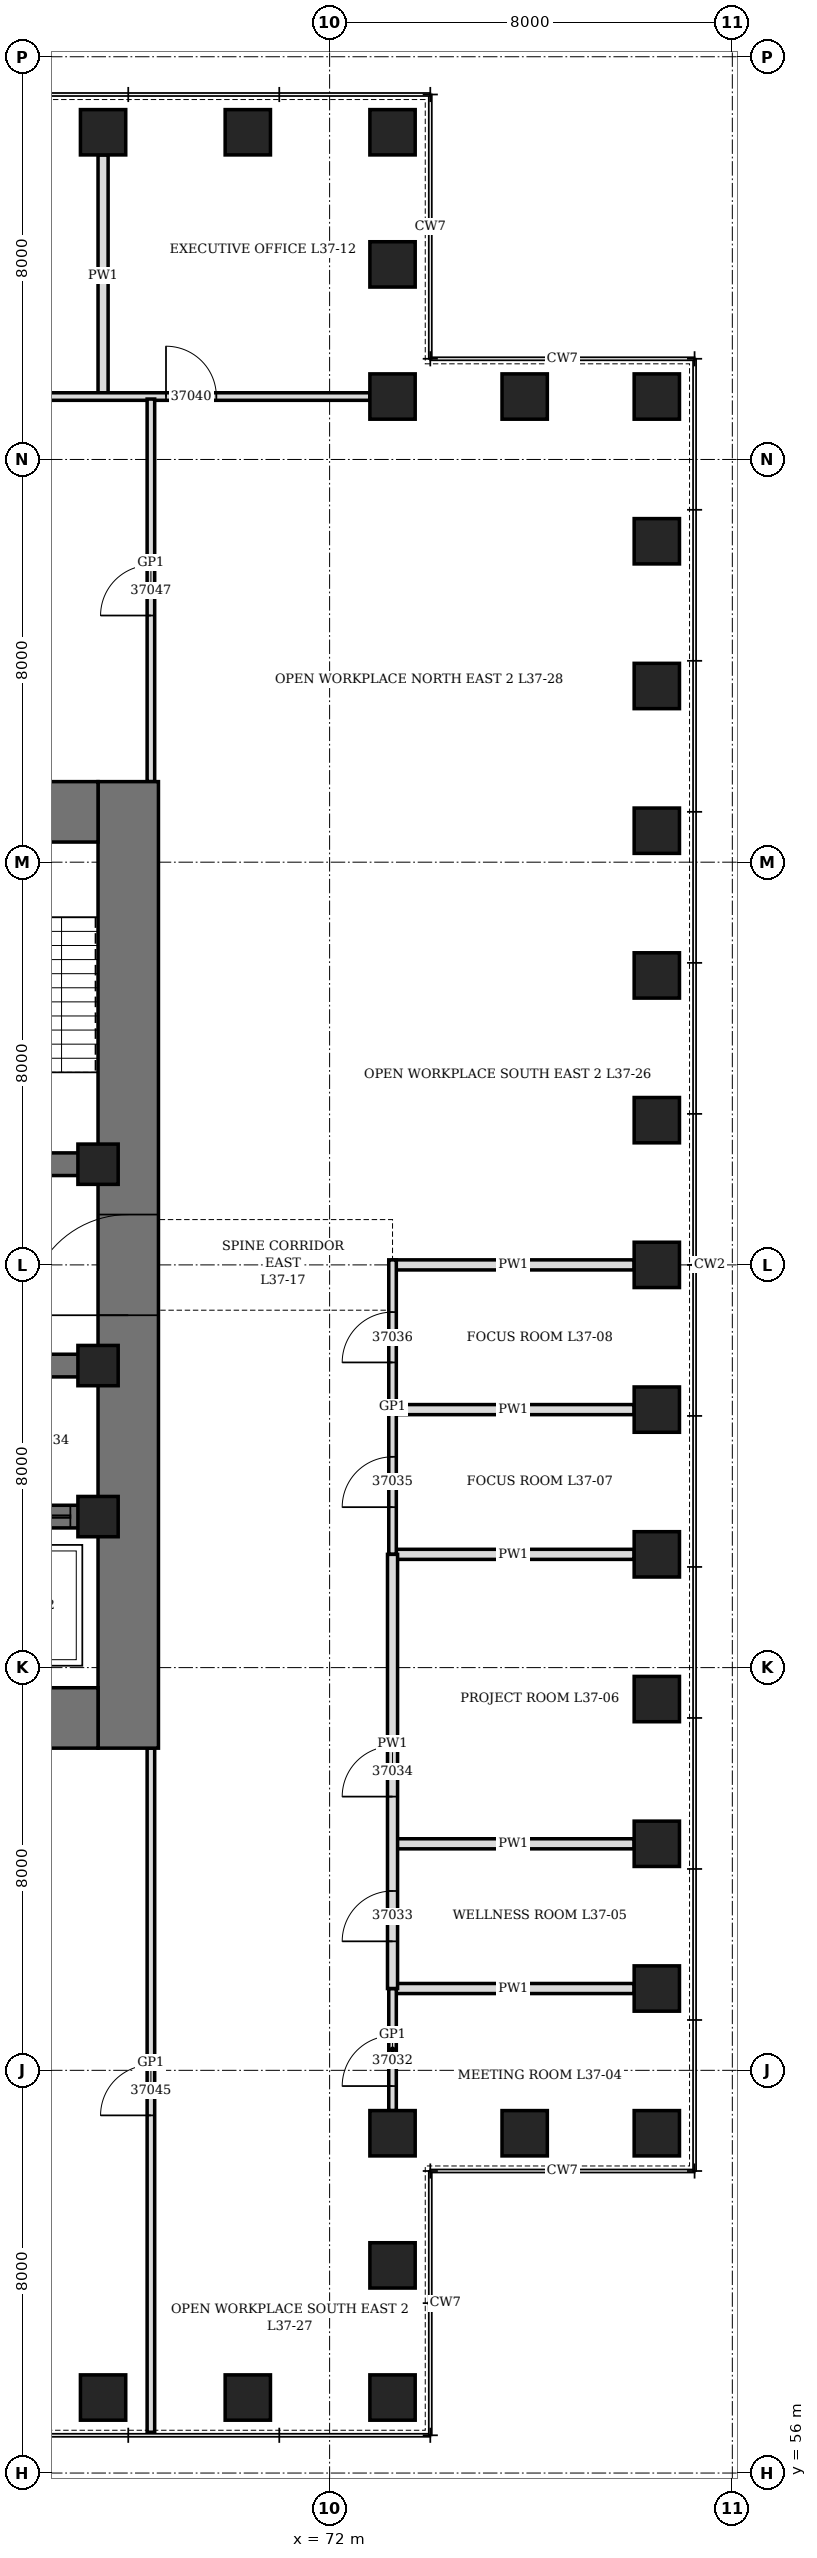
"""IFC4 building model, lengths in metres.
Left out: names, types, materials, properties, quantities, classifications, styles, units other than length and angle.
Written with IfcOpenShell. Run it as: python <this file> out.ifc"""

import sys

from ifc_helpers import new_model, si_unit, direction, frame, frame_2d, origin, origin_2d, place, context, subcontext, project, spatial, rectangle, hollow_rectangle, extrude, element, fill, save


model = new_model("IFC4")
c1 = context("Model", 3, precision=1e-05, world=origin(), true_north=direction((0.0, 1.0)))
c2 = subcontext(c1, "Body", "Model", "MODEL_VIEW")
j1 = project(units=[si_unit("LENGTHUNIT", "METRE"), si_unit("PLANEANGLEUNIT", "RADIAN")], contexts=[c1])
p1 = place(None, origin())
s1 = spatial("IfcSite", under=j1, at=p1, CompositionType="ELEMENT")
p2 = place(p1, origin())
s2 = spatial("IfcBuilding", under=s1, at=p2, CompositionType="ELEMENT")
p3 = place(p2, frame((0.0, 0.0, 166.9)))
s3 = spatial("IfcBuildingStorey", under=s2, at=p3, CompositionType="ELEMENT", Elevation=166.9)
for number, where, z_axis, x_axis in (
    (1, (67.5, 57.5, 0.0), (0.0, 0.0, 1.0), (1.0, 0.0, 0.0)),
    (2, (70.375, 57.5, 0.0), (0.0, 0.0, 1.0), (1.0, 0.0, 0.0)),
    (3, (73.25, 57.5, 0.0), (0.0, 0.0, 1.0), (0.0, 1.0, 0.0)),
    (4, (73.25, 60.125, 0.0), (0.0, 0.0, 1.0), (0.0, 1.0, 0.0)),
    (5, (73.25, 62.75, 0.0), (0.0, 0.0, 1.0), (1.0, 0.0, 0.0)),
    (6, (75.875, 62.75, 0.0), (0.0, 0.0, 1.0), (1.0, 0.0, 0.0)),
    (7, (78.5, 62.75, 0.0), (0.0, 0.0, 1.0), (0.0, 1.0, 0.0)),
    (8, (78.5, 65.625, 0.0), (0.0, 0.0, 1.0), (0.0, 1.0, 0.0)),
    (9, (78.5, 68.5, 0.0), (0.0, 0.0, 1.0), (0.0, 1.0, 0.0)),
    (10, (78.5, 71.375, 0.0), (0.0, 0.0, 1.0), (0.0, 1.0, 0.0)),
    (11, (78.5, 74.25, 0.0), (0.0, 0.0, 1.0), (0.0, 1.0, 0.0)),
    (12, (78.5, 77.125, 0.0), (0.0, 0.0, 1.0), (0.0, 1.0, 0.0)),
    (13, (78.5, 80.0, 0.0), (0.0, 0.0, 1.0), (0.0, 1.0, 0.0)),
    (14, (78.5, 82.875, 0.0), (0.0, 0.0, 1.0), (0.0, 1.0, 0.0)),
    (15, (78.5, 85.75, 0.0), (0.0, 0.0, 1.0), (0.0, 1.0, 0.0)),
    (16, (78.5, 88.625, 0.0), (0.0, 0.0, 1.0), (0.0, 1.0, 0.0)),
    (17, (78.5, 91.5, 0.0), (0.0, 0.0, 1.0), (0.0, 1.0, 0.0)),
    (18, (78.5, 94.375, 0.0), (0.0, 0.0, 1.0), (0.0, 1.0, 0.0)),
    (19, (78.5, 97.25, 0.0), (0.0, 0.0, 1.0), (1.0, 0.0, 0.0)),
    (20, (75.875, 97.25, 0.0), (0.0, 0.0, 1.0), (1.0, 0.0, 0.0)),
    (21, (73.25, 97.25, 0.0), (0.0, 0.0, 1.0), (0.0, 1.0, 0.0)),
    (22, (73.25, 99.875, 0.0), (0.0, 0.0, 1.0), (0.0, 1.0, 0.0)),
    (23, (73.25, 102.5, 0.0), (0.0, 0.0, 1.0), (1.0, 0.0, 0.0)),
    (24, (70.375, 102.5, 0.0), (0.0, 0.0, 1.0), (1.0, 0.0, 0.0)),
    (25, (67.5, 102.5, 0.0), (0.0, 0.0, 1.0), (1.0, 0.0, 0.0)),
):
    element("IfcColumn", number, at=place(p3, frame(where, z_axis=z_axis, x_axis=x_axis)), inside=s3, PredefinedType="COLUMN", context=c2, shape_type="SweptSolid", body=[
        extrude(hollow_rectangle(XDim=0.9, YDim=0.9, WallThickness=0.12, at=origin_2d()), origin(), (0.0, 0.0, 1.0), 4.2),
    ])
p4 = place(p3, frame((68.0, 70.4, 0.0), z_axis=(0.0, 0.0, 1.0), x_axis=(0.0, 1.0, 0.0)))
e26 = element("IfcWall", 26, at=p4, inside=s3, PredefinedType="SHEAR", context=c2, shape_type="SweptSolid", body=[
    extrude(rectangle(XDim=19.2, YDim=1.2, at=frame_2d((9.6, 0.0))), origin(), (0.0, 0.0, 1.0), 4.2),
])
p5 = place(p4, frame((8.6, 0.0, 0.0)))
e27 = element("IfcOpeningElement", 27, at=p5, cuts=e26, PredefinedType="OPENING", context=c2, shape_type="SweptSolid", body=[
    extrude(rectangle(XDim=2.0, YDim=2.4, at=frame_2d((1.0, 1.2))), frame((0.0, 0.61, 0.0), z_axis=(0.0, -1.0, 0.0), x_axis=(1.0, 0.0, 0.0)), (0.0, 0.0, 1.0), 1.22),
])
p6 = place(p3, frame((44.6, 71.0, 0.0), z_axis=(0.0, 0.0, 1.0), x_axis=(1.0, 0.0, 0.0)))
e28 = element("IfcWall", 28, at=p6, inside=s3, PredefinedType="SHEAR", context=c2, shape_type="SweptSolid", body=[
    extrude(rectangle(XDim=22.8, YDim=1.2, at=frame_2d((11.4, 0.0))), origin(), (0.0, 0.0, 1.0), 4.2),
])
p7 = place(p3, frame((44.6, 89.0, 0.0), z_axis=(0.0, 0.0, 1.0), x_axis=(1.0, 0.0, 0.0)))
e29 = element("IfcWall", 29, at=p7, inside=s3, PredefinedType="SHEAR", context=c2, shape_type="SweptSolid", body=[
    extrude(rectangle(XDim=22.8, YDim=1.2, at=frame_2d((11.4, 0.0))), origin(), (0.0, 0.0, 1.0), 4.2),
])
p8 = place(p7, frame((6.525, 0.0, 0.0)))
e30 = element("IfcOpeningElement", 30, at=p8, cuts=e29, PredefinedType="OPENING", context=c2, shape_type="SweptSolid", body=[
    extrude(rectangle(XDim=1.0, YDim=2.1, at=frame_2d((0.5, 1.05))), frame((0.0, 0.61, 0.0), z_axis=(0.0, -1.0, 0.0), x_axis=(1.0, 0.0, 0.0)), (0.0, 0.0, 1.0), 1.22),
])
p9 = place(p7, frame((9.45, 0.0, 0.0)))
e31 = element("IfcOpeningElement", 31, at=p9, cuts=e29, PredefinedType="OPENING", context=c2, shape_type="SweptSolid", body=[
    extrude(rectangle(XDim=0.9, YDim=2.1, at=frame_2d((0.45, 1.05))), frame((0.0, 0.61, 0.0), z_axis=(0.0, -1.0, 0.0), x_axis=(1.0, 0.0, 0.0)), (0.0, 0.0, 1.0), 1.22),
])
p10 = place(p7, frame((12.025, 0.0, 0.0)))
e32 = element("IfcOpeningElement", 32, at=p10, cuts=e29, PredefinedType="OPENING", context=c2, shape_type="SweptSolid", body=[
    extrude(rectangle(XDim=0.9, YDim=2.1, at=frame_2d((0.45, 1.05))), frame((0.0, 0.61, 0.0), z_axis=(0.0, -1.0, 0.0), x_axis=(1.0, 0.0, 0.0)), (0.0, 0.0, 1.0), 1.22),
])
p11 = place(p7, frame((13.962, 0.0, 0.0)))
e33 = element("IfcOpeningElement", 33, at=p11, cuts=e29, PredefinedType="OPENING", context=c2, shape_type="SweptSolid", body=[
    extrude(rectangle(XDim=0.9, YDim=2.1, at=frame_2d((0.45, 1.05))), frame((0.0, 0.61, 0.0), z_axis=(0.0, -1.0, 0.0), x_axis=(1.0, 0.0, 0.0)), (0.0, 0.0, 1.0), 1.22),
])
p12 = place(p3, frame((62.225, 75.0, 0.0), z_axis=(0.0, 0.0, 1.0), x_axis=(1.0, 0.0, 0.0)))
e34 = element("IfcWall", 34, at=p12, inside=s3, PredefinedType="SHEAR", context=c2, shape_type="SweptSolid", body=[
    extrude(rectangle(XDim=5.175, YDim=0.45, at=frame_2d((2.587, 0.0))), origin(), (0.0, 0.0, 1.0), 4.2),
])
p13 = place(p12, frame((0.675, 0.0, 0.0)))
e35 = element("IfcOpeningElement", 35, at=p13, cuts=e34, PredefinedType="OPENING", context=c2, shape_type="SweptSolid", body=[
    extrude(rectangle(XDim=1.2, YDim=2.2, at=frame_2d((0.6, 1.1))), frame((0.0, 0.235, 0.0), z_axis=(0.0, -1.0, 0.0), x_axis=(1.0, 0.0, 0.0)), (0.0, 0.0, 1.0), 0.47),
])
p14 = place(p12, frame((3.425, 0.0, 0.0)))
e36 = element("IfcOpeningElement", 36, at=p14, cuts=e34, PredefinedType="OPENING", context=c2, shape_type="SweptSolid", body=[
    extrude(rectangle(XDim=1.2, YDim=2.2, at=frame_2d((0.6, 1.1))), frame((0.0, 0.235, 0.0), z_axis=(0.0, -1.0, 0.0), x_axis=(1.0, 0.0, 0.0)), (0.0, 0.0, 1.0), 0.47),
])
p15 = place(p3, frame((62.225, 78.0, 0.0), z_axis=(0.0, 0.0, 1.0), x_axis=(1.0, 0.0, 0.0)))
e37 = element("IfcWall", 37, at=p15, inside=s3, PredefinedType="SHEAR", context=c2, shape_type="SweptSolid", body=[
    extrude(rectangle(XDim=5.175, YDim=0.45, at=frame_2d((2.587, 0.0))), origin(), (0.0, 0.0, 1.0), 4.2),
])
p16 = place(p15, frame((2.175, 0.0, 0.0)))
e38 = element("IfcOpeningElement", 38, at=p16, cuts=e37, PredefinedType="OPENING", context=c2, shape_type="SweptSolid", body=[
    extrude(rectangle(XDim=1.2, YDim=2.1, at=frame_2d((0.6, 1.05))), frame((0.0, 0.235, 0.0), z_axis=(0.0, -1.0, 0.0), x_axis=(1.0, 0.0, 0.0)), (0.0, 0.0, 1.0), 0.47),
])
p17 = place(p3, frame((62.225, 82.0, 0.0), z_axis=(0.0, 0.0, 1.0), x_axis=(1.0, 0.0, 0.0)))
e39 = element("IfcWall", 39, at=p17, inside=s3, PredefinedType="SHEAR", context=c2, shape_type="SweptSolid", body=[
    extrude(rectangle(XDim=5.175, YDim=0.45, at=frame_2d((2.587, 0.0))), origin(), (0.0, 0.0, 1.0), 4.2),
])
p18 = place(p17, frame((2.175, 0.0, 0.0)))
e40 = element("IfcOpeningElement", 40, at=p18, cuts=e39, PredefinedType="OPENING", context=c2, shape_type="SweptSolid", body=[
    extrude(rectangle(XDim=1.2, YDim=2.1, at=frame_2d((0.6, 1.05))), frame((0.0, 0.235, 0.0), z_axis=(0.0, -1.0, 0.0), x_axis=(1.0, 0.0, 0.0)), (0.0, 0.0, 1.0), 0.47),
])
for number, where, z_axis, x_axis in (
    (41, (67.4, 75.0, 0.0), (0.0, 0.0, 1.0), (1.0, 0.0, 0.0)),
    (42, (67.4, 78.0, 0.0), (0.0, 0.0, 1.0), (1.0, 0.0, 0.0)),
    (43, (67.4, 82.0, 0.0), (0.0, 0.0, 1.0), (1.0, 0.0, 0.0)),
):
    element("IfcColumn", number, at=place(p3, frame(where, z_axis=z_axis, x_axis=x_axis)), inside=s3, PredefinedType="COLUMN", context=c2, shape_type="SweptSolid", body=[
        extrude(hollow_rectangle(XDim=0.8, YDim=0.8, WallThickness=0.1, at=origin_2d()), origin(), (0.0, 0.0, 1.0), 4.2),
    ])
for number, where, z_axis, x_axis in (
    (44, (73.25, 65.625, 0.0), (0.0, 0.0, 1.0), (1.0, 0.0, 0.0)),
    (45, (73.25, 68.5, 0.0), (0.0, 0.0, 1.0), (1.0, 0.0, 0.0)),
    (46, (73.25, 74.25, 0.0), (0.0, 0.0, 1.0), (1.0, 0.0, 0.0)),
    (47, (73.25, 77.125, 0.0), (0.0, 0.0, 1.0), (1.0, 0.0, 0.0)),
    (48, (73.25, 80.0, 0.0), (0.0, 0.0, 1.0), (1.0, 0.0, 0.0)),
):
    element("IfcWall", number, at=place(p3, frame(where, z_axis=z_axis, x_axis=x_axis)), inside=s3, PredefinedType="PARTITIONING", context=c2, shape_type="SweptSolid", body=[
        extrude(rectangle(XDim=4.8, YDim=0.2, at=frame_2d((2.4, 0.0))), origin(), (0.0, 0.0, 1.0), 3.428),
    ])
p19 = place(p3, frame((67.5, 97.25, 0.0), z_axis=(0.0, 0.0, 1.0), x_axis=(0.0, 1.0, 0.0)))
e49 = element("IfcWall", 49, at=p19, inside=s3, PredefinedType="PARTITIONING", context=c2, shape_type="SweptSolid", body=[
    extrude(rectangle(XDim=4.8, YDim=0.2, at=frame_2d((2.4, 0.0))), origin(), (0.0, 0.0, 1.0), 2.74),
])
p20 = place(p3, frame((39.2, 97.25, 0.0), z_axis=(0.0, 0.0, 1.0), x_axis=(1.0, 0.0, 0.0)))
e50 = element("IfcWall", 50, at=p20, inside=s3, PredefinedType="PARTITIONING", context=c2, shape_type="SweptSolid", body=[
    extrude(rectangle(XDim=33.6, YDim=0.15, at=frame_2d((16.8, 0.0))), origin(), (0.0, 0.0, 1.0), 4.04),
])
p21 = place(p20, frame((3.05, 0.0, 0.0)))
e51 = element("IfcOpeningElement", 51, at=p21, cuts=e50, PredefinedType="OPENING", context=c2, shape_type="SweptSolid", body=[
    extrude(rectangle(XDim=1.0, YDim=2.4, at=frame_2d((0.5, 1.2))), frame((0.0, 0.085, 0.0), z_axis=(0.0, -1.0, 0.0), x_axis=(1.0, 0.0, 0.0)), (0.0, 0.0, 1.0), 0.17),
])
p22 = place(p20, frame((14.863, 0.0, 0.0)))
e52 = element("IfcOpeningElement", 52, at=p22, cuts=e50, PredefinedType="OPENING", context=c2, shape_type="SweptSolid", body=[
    extrude(rectangle(XDim=1.0, YDim=2.4, at=frame_2d((0.5, 1.2))), frame((0.0, 0.085, 0.0), z_axis=(0.0, -1.0, 0.0), x_axis=(1.0, 0.0, 0.0)), (0.0, 0.0, 1.0), 0.17),
])
p23 = place(p20, frame((23.488, 0.0, 0.0)))
e53 = element("IfcOpeningElement", 53, at=p23, cuts=e50, PredefinedType="OPENING", context=c2, shape_type="SweptSolid", body=[
    extrude(rectangle(XDim=1.0, YDim=2.1, at=frame_2d((0.5, 1.05))), frame((0.0, 0.085, 0.0), z_axis=(0.0, -1.0, 0.0), x_axis=(1.0, 0.0, 0.0)), (0.0, 0.0, 1.0), 0.17),
])
p24 = place(p20, frame((29.55, 0.0, 0.0)))
e54 = element("IfcOpeningElement", 54, at=p24, cuts=e50, PredefinedType="OPENING", context=c2, shape_type="SweptSolid", body=[
    extrude(rectangle(XDim=1.0, YDim=2.1, at=frame_2d((0.5, 1.05))), frame((0.0, 0.085, 0.0), z_axis=(0.0, -1.0, 0.0), x_axis=(1.0, 0.0, 0.0)), (0.0, 0.0, 1.0), 0.17),
])
p25 = place(p3, frame((68.45, 56.81, 0.0), z_axis=(0.0, 0.0, 1.0), x_axis=(0.0, 1.0, 0.0)))
e55 = element("IfcWall", 55, at=p25, inside=s3, PredefinedType="PARTITIONING", context=c2, shape_type="SweptSolid", body=[
    extrude(rectangle(XDim=13.59, YDim=0.15, at=frame_2d((6.795, 0.0))), origin(), (0.0, 0.0, 1.0), 4.04),
])
p26 = place(p25, frame((6.295, 0.0, 0.0)))
e56 = element("IfcOpeningElement", 56, at=p26, cuts=e55, PredefinedType="OPENING", context=c2, shape_type="SweptSolid", body=[
    extrude(rectangle(XDim=1.0, YDim=2.4, at=frame_2d((0.5, 1.2))), frame((0.0, 0.085, 0.0), z_axis=(0.0, -1.0, 0.0), x_axis=(1.0, 0.0, 0.0)), (0.0, 0.0, 1.0), 0.17),
])
p27 = place(p3, frame((68.45, 89.6, 0.0), z_axis=(0.0, 0.0, 1.0), x_axis=(0.0, 1.0, 0.0)))
e57 = element("IfcWall", 57, at=p27, inside=s3, PredefinedType="PARTITIONING", context=c2, shape_type="SweptSolid", body=[
    extrude(rectangle(XDim=7.6, YDim=0.15, at=frame_2d((3.8, 0.0))), origin(), (0.0, 0.0, 1.0), 4.04),
])
p28 = place(p27, frame((3.3, 0.0, 0.0)))
e58 = element("IfcOpeningElement", 58, at=p28, cuts=e57, PredefinedType="OPENING", context=c2, shape_type="SweptSolid", body=[
    extrude(rectangle(XDim=1.0, YDim=2.4, at=frame_2d((0.5, 1.2))), frame((0.0, 0.085, 0.0), z_axis=(0.0, -1.0, 0.0), x_axis=(1.0, 0.0, 0.0)), (0.0, 0.0, 1.0), 0.17),
])
p29 = place(p3, frame((73.25, 63.2, 0.0), z_axis=(0.0, 0.0, 1.0), x_axis=(0.0, 1.0, 0.0)))
e59 = element("IfcWall", 59, at=p29, inside=s3, PredefinedType="PARTITIONING", context=c2, shape_type="SweptSolid", body=[
    extrude(rectangle(XDim=2.425, YDim=0.15, at=frame_2d((1.212, 0.0))), origin(), (0.0, 0.0, 1.0), 4.04),
])
p30 = place(p29, frame((0.488, 0.0, 0.0)))
e60 = element("IfcOpeningElement", 60, at=p30, cuts=e59, PredefinedType="OPENING", context=c2, shape_type="SweptSolid", body=[
    extrude(rectangle(XDim=1.0, YDim=2.4, at=frame_2d((0.5, 1.2))), frame((0.0, 0.085, 0.0), z_axis=(0.0, -1.0, 0.0), x_axis=(1.0, 0.0, 0.0)), (0.0, 0.0, 1.0), 0.17),
])
p31 = place(p3, frame((73.25, 74.25, 0.0), z_axis=(0.0, 0.0, 1.0), x_axis=(0.0, 1.0, 0.0)))
e61 = element("IfcWall", 61, at=p31, inside=s3, PredefinedType="PARTITIONING", context=c2, shape_type="SweptSolid", body=[
    extrude(rectangle(XDim=5.85, YDim=0.15, at=frame_2d((2.925, 0.0))), origin(), (0.0, 0.0, 1.0), 4.04),
])
p32 = place(p31, frame((0.938, 0.0, 0.0)))
e62 = element("IfcOpeningElement", 62, at=p32, cuts=e61, PredefinedType="OPENING", context=c2, shape_type="SweptSolid", body=[
    extrude(rectangle(XDim=1.0, YDim=2.4, at=frame_2d((0.5, 1.2))), frame((0.0, 0.085, 0.0), z_axis=(0.0, -1.0, 0.0), x_axis=(1.0, 0.0, 0.0)), (0.0, 0.0, 1.0), 0.17),
])
p33 = place(p31, frame((3.812, 0.0, 0.0)))
e63 = element("IfcOpeningElement", 63, at=p33, cuts=e61, PredefinedType="OPENING", context=c2, shape_type="SweptSolid", body=[
    extrude(rectangle(XDim=1.0, YDim=2.4, at=frame_2d((0.5, 1.2))), frame((0.0, 0.085, 0.0), z_axis=(0.0, -1.0, 0.0), x_axis=(1.0, 0.0, 0.0)), (0.0, 0.0, 1.0), 0.17),
])
p34 = place(p3, frame((73.25, 65.625, 0.0), z_axis=(0.0, 0.0, 1.0), x_axis=(0.0, 1.0, 0.0)))
e64 = element("IfcWall", 64, at=p34, inside=s3, PredefinedType="PARTITIONING", context=c2, shape_type="SweptSolid", body=[
    extrude(rectangle(XDim=8.625, YDim=0.2, at=frame_2d((4.312, 0.0))), origin(), (0.0, 0.0, 1.0), 4.04),
])
p35 = place(p34, frame((0.938, 0.0, 0.0)))
e65 = element("IfcOpeningElement", 65, at=p35, cuts=e64, PredefinedType="OPENING", context=c2, shape_type="SweptSolid", body=[
    extrude(rectangle(XDim=1.0, YDim=2.1, at=frame_2d((0.5, 1.05))), frame((0.0, 0.11, 0.0), z_axis=(0.0, -1.0, 0.0), x_axis=(1.0, 0.0, 0.0)), (0.0, 0.0, 1.0), 0.22),
])
p36 = place(p34, frame((3.812, 0.0, 0.0)))
e66 = element("IfcOpeningElement", 66, at=p36, cuts=e64, PredefinedType="OPENING", context=c2, shape_type="SweptSolid", body=[
    extrude(rectangle(XDim=1.0, YDim=2.1, at=frame_2d((0.5, 1.05))), frame((0.0, 0.11, 0.0), z_axis=(0.0, -1.0, 0.0), x_axis=(1.0, 0.0, 0.0)), (0.0, 0.0, 1.0), 0.22),
])
p37 = place(p5, origin())
e67 = element("IfcDoor", 67, at=p37, inside=s3, OperationType="DOUBLE_DOOR_SINGLE_SWING", PredefinedType="DOOR", context=c2, shape_type="SweptSolid", body=[
    extrude(rectangle(XDim=2.0, YDim=2.4, at=frame_2d((1.0, 1.2))), frame((0.0, 0.35, 0.0), z_axis=(0.0, -1.0, 0.0), x_axis=(1.0, 0.0, 0.0)), (0.0, 0.0, 1.0), 0.7),
])
fill(e27, e67)
p38 = place(p14, origin())
e68 = element("IfcDoor", 68, at=p38, inside=s3, OperationType="SLIDING_TO_LEFT", PredefinedType="DOOR", context=c2, shape_type="SweptSolid", body=[
    extrude(rectangle(XDim=1.2, YDim=2.2, at=frame_2d((0.6, 1.1))), frame((0.0, 0.225, 0.0), z_axis=(0.0, -1.0, 0.0), x_axis=(1.0, 0.0, 0.0)), (0.0, 0.0, 1.0), 0.449),
])
fill(e36, e68)
p39 = place(p30, origin())
e69 = element("IfcDoor", 69, at=p39, inside=s3, OperationType="SINGLE_SWING_RIGHT", PredefinedType="DOOR", context=c2, shape_type="SweptSolid", body=[
    extrude(rectangle(XDim=1.0, YDim=2.4, at=frame_2d((0.5, 1.2))), frame((0.0, 0.075, 0.0), z_axis=(0.0, -1.0, 0.0), x_axis=(1.0, 0.0, 0.0)), (0.0, 0.0, 1.0), 0.149),
])
fill(e60, e69)
p40 = place(p35, origin())
e70 = element("IfcDoor", 70, at=p40, inside=s3, OperationType="SINGLE_SWING_LEFT", PredefinedType="DOOR", context=c2, shape_type="SweptSolid", body=[
    extrude(rectangle(XDim=1.0, YDim=2.1, at=frame_2d((0.5, 1.05))), frame((0.0, 0.1, 0.0), z_axis=(0.0, -1.0, 0.0), x_axis=(1.0, 0.0, 0.0)), (0.0, 0.0, 1.0), 0.199),
])
fill(e65, e70)
p41 = place(p36, origin())
e71 = element("IfcDoor", 71, at=p41, inside=s3, OperationType="SINGLE_SWING_LEFT", PredefinedType="DOOR", context=c2, shape_type="SweptSolid", body=[
    extrude(rectangle(XDim=1.0, YDim=2.1, at=frame_2d((0.5, 1.05))), frame((0.0, 0.1, 0.0), z_axis=(0.0, -1.0, 0.0), x_axis=(1.0, 0.0, 0.0)), (0.0, 0.0, 1.0), 0.199),
])
fill(e66, e71)
p42 = place(p32, origin())
e72 = element("IfcDoor", 72, at=p42, inside=s3, OperationType="SINGLE_SWING_RIGHT", PredefinedType="DOOR", context=c2, shape_type="SweptSolid", body=[
    extrude(rectangle(XDim=1.0, YDim=2.4, at=frame_2d((0.5, 1.2))), frame((0.0, 0.075, 0.0), z_axis=(0.0, -1.0, 0.0), x_axis=(1.0, 0.0, 0.0)), (0.0, 0.0, 1.0), 0.149),
])
fill(e62, e72)
p43 = place(p33, origin())
e73 = element("IfcDoor", 73, at=p43, inside=s3, OperationType="SINGLE_SWING_RIGHT", PredefinedType="DOOR", context=c2, shape_type="SweptSolid", body=[
    extrude(rectangle(XDim=1.0, YDim=2.4, at=frame_2d((0.5, 1.2))), frame((0.0, 0.075, 0.0), z_axis=(0.0, -1.0, 0.0), x_axis=(1.0, 0.0, 0.0)), (0.0, 0.0, 1.0), 0.149),
])
fill(e63, e73)
p44 = place(p24, origin())
e74 = element("IfcDoor", 74, at=p44, inside=s3, OperationType="SINGLE_SWING_LEFT", PredefinedType="DOOR", context=c2, shape_type="SweptSolid", body=[
    extrude(rectangle(XDim=1.0, YDim=2.1, at=frame_2d((0.5, 1.05))), frame((0.0, 0.075, 0.0), z_axis=(0.0, -1.0, 0.0), x_axis=(1.0, 0.0, 0.0)), (0.0, 0.0, 1.0), 0.149),
])
fill(e54, e74)
p45 = place(p26, origin())
e75 = element("IfcDoor", 75, at=p45, inside=s3, OperationType="SINGLE_SWING_RIGHT", PredefinedType="DOOR", context=c2, shape_type="SweptSolid", body=[
    extrude(rectangle(XDim=1.0, YDim=2.4, at=frame_2d((0.5, 1.2))), frame((0.0, 0.075, 0.0), z_axis=(0.0, -1.0, 0.0), x_axis=(1.0, 0.0, 0.0)), (0.0, 0.0, 1.0), 0.149),
])
fill(e56, e75)
p46 = place(p28, origin())
e76 = element("IfcDoor", 76, at=p46, inside=s3, OperationType="SINGLE_SWING_RIGHT", PredefinedType="DOOR", context=c2, shape_type="SweptSolid", body=[
    extrude(rectangle(XDim=1.0, YDim=2.4, at=frame_2d((0.5, 1.2))), frame((0.0, 0.075, 0.0), z_axis=(0.0, -1.0, 0.0), x_axis=(1.0, 0.0, 0.0)), (0.0, 0.0, 1.0), 0.149),
])
fill(e58, e76)
save(model, sys.argv[1])
